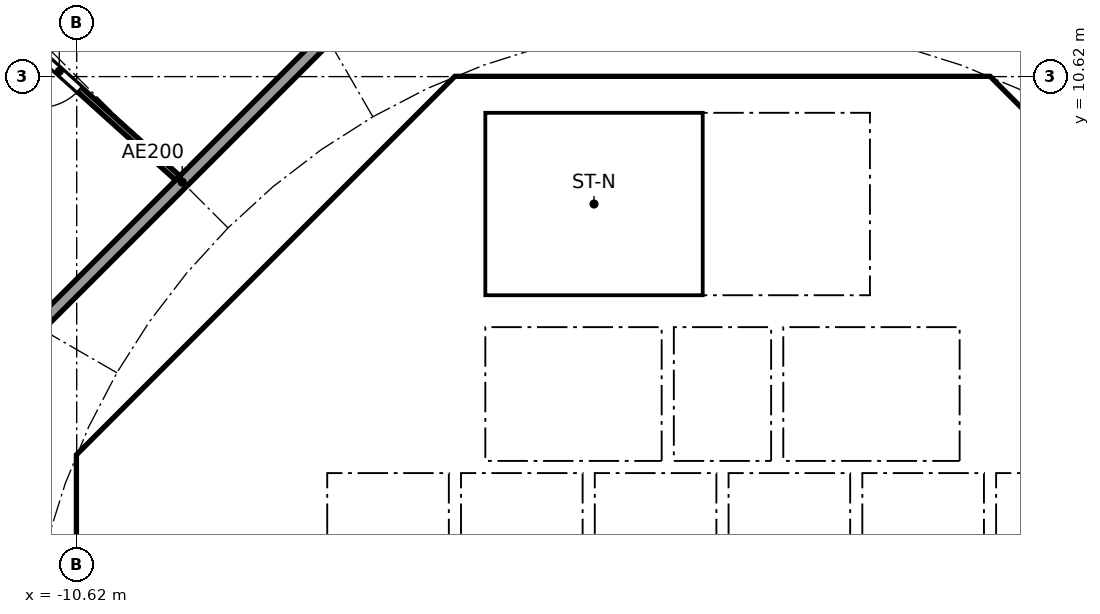
"""IFC4 building model, lengths in metres.
Left out: names, types, materials, properties, quantities, classifications, styles, units other than length and angle.
Written with IfcOpenShell. Run it as: python <this file> out.ifc"""

import sys

from ifc_helpers import new_model, si_unit, direction, frame, frame_2d, origin, place, context, subcontext, project, spatial, polyline, rectangle, outline, extrude, element, fill, save


model = new_model("IFC4")
c1 = context("Model", 3, precision=1e-05, world=origin(), true_north=direction((0.0, 1.0)))
c2 = subcontext(c1, "Body", "Model", "MODEL_VIEW")
j1 = project(units=[si_unit("LENGTHUNIT", "METRE"), si_unit("PLANEANGLEUNIT", "RADIAN")], contexts=[c1])
p1 = place(None, origin())
s1 = spatial("IfcSite", under=j1, at=p1, CompositionType="ELEMENT")
p2 = place(p1, origin())
s2 = spatial("IfcBuilding", under=s1, at=p2, CompositionType="ELEMENT")
p3 = place(p2, frame((0.0, 0.0, 73.3)))
s3 = spatial("IfcBuildingStorey", under=s2, at=p3, CompositionType="ELEMENT", Elevation=73.3)
p4 = place(p3, frame((9.988, 4.613, 0.0), z_axis=(0.0, 0.0, 1.0), x_axis=(-0.707106781187, 0.707106781187, 0.0)))
e1 = element("IfcWall", 1, at=p4, inside=s3, PredefinedType="SHEAR", context=c2, shape_type="SweptSolid", body=[
    extrude(rectangle(XDim=7.602, YDim=0.6, at=frame_2d((3.801, 0.0))), origin(), (0.0, 0.0, 1.0), 3.44),
])
p5 = place(p4, frame((3.201, 0.0, 0.0)))
e2 = element("IfcOpeningElement", 2, at=p5, cuts=e1, PredefinedType="OPENING", context=c2, shape_type="SweptSolid", body=[
    extrude(rectangle(XDim=1.2, YDim=2.1, at=frame_2d((0.6, 1.05))), frame((0.0, 0.31, 0.0), z_axis=(0.0, -1.0, 0.0), x_axis=(1.0, 0.0, 0.0)), (0.0, 0.0, 1.0), 0.62),
])
p6 = place(p3, frame((-4.613, 9.988, 0.0), z_axis=(0.0, 0.0, 1.0), x_axis=(-0.707106781187, -0.707106781187, 0.0)))
e3 = element("IfcWall", 3, at=p6, inside=s3, PredefinedType="SHEAR", context=c2, shape_type="SweptSolid", body=[
    extrude(rectangle(XDim=7.602, YDim=0.6, at=frame_2d((3.801, 0.0))), origin(), (0.0, 0.0, 1.0), 3.44),
])
p7 = place(p6, frame((0.351, 0.0, 0.0)))
e4 = element("IfcOpeningElement", 4, at=p7, cuts=e3, PredefinedType="OPENING", context=c2, shape_type="SweptSolid", body=[
    extrude(rectangle(XDim=1.1, YDim=2.1, at=frame_2d((0.55, 1.05))), frame((0.0, 0.31, 0.0), z_axis=(0.0, -1.0, 0.0), x_axis=(1.0, 0.0, 0.0)), (0.0, 0.0, 1.0), 0.62),
])
p8 = place(p3, frame((-10.325, 3.801, 0.0), z_axis=(0.0, 0.0, 1.0), x_axis=(0.0, -1.0, 0.0)))
e5 = element("IfcWall", 5, at=p8, inside=s3, PredefinedType="SHEAR", context=c2, shape_type="SweptSolid", body=[
    extrude(rectangle(XDim=7.602, YDim=0.6, at=frame_2d((3.801, 0.0))), origin(), (0.0, 0.0, 1.0), 3.44),
])
p9 = place(p8, frame((0.651, 0.0, 0.0)))
e6 = element("IfcOpeningElement", 6, at=p9, cuts=e5, PredefinedType="OPENING", context=c2, shape_type="SweptSolid", body=[
    extrude(rectangle(XDim=1.5, YDim=2.1, at=frame_2d((0.75, 1.05))), frame((0.0, 0.31, 0.0), z_axis=(0.0, -1.0, 0.0), x_axis=(1.0, 0.0, 0.0)), (0.0, 0.0, 1.0), 0.62),
])
p10 = place(p8, frame((5.451, 0.0, 0.0)))
e7 = element("IfcOpeningElement", 7, at=p10, cuts=e5, PredefinedType="OPENING", context=c2, shape_type="SweptSolid", body=[
    extrude(rectangle(XDim=1.5, YDim=2.1, at=frame_2d((0.75, 1.05))), frame((0.0, 0.31, 0.0), z_axis=(0.0, -1.0, 0.0), x_axis=(1.0, 0.0, 0.0)), (0.0, 0.0, 1.0), 0.62),
])
p11 = place(p3, frame((-6.2, 4.3, 0.0), z_axis=(0.0, 0.0, 1.0), x_axis=(0.0, 1.0, 0.0)))
e8 = element("IfcWall", 8, at=p11, inside=s3, PredefinedType="PARTITIONING", context=c2, shape_type="SweptSolid", body=[
    extrude(rectangle(XDim=3.527, YDim=0.15, at=frame_2d((1.763, 0.0))), origin(), (0.0, 0.0, 1.0), 3.44),
])
p12 = place(p11, frame((0.262, 0.0, 0.0)))
e9 = element("IfcOpeningElement", 9, at=p12, cuts=e8, PredefinedType="OPENING", context=c2, shape_type="SweptSolid", body=[
    extrude(rectangle(XDim=0.9, YDim=2.1, at=frame_2d((0.45, 1.05))), frame((0.0, 0.085, 0.0), z_axis=(0.0, -1.0, 0.0), x_axis=(1.0, 0.0, 0.0)), (0.0, 0.0, 1.0), 0.17),
])
p13 = place(p11, frame((2.138, 0.0, 0.0)))
e10 = element("IfcOpeningElement", 10, at=p13, cuts=e8, PredefinedType="OPENING", context=c2, shape_type="SweptSolid", body=[
    extrude(rectangle(XDim=0.9, YDim=2.1, at=frame_2d((0.45, 1.05))), frame((0.0, 0.085, 0.0), z_axis=(0.0, -1.0, 0.0), x_axis=(1.0, 0.0, 0.0)), (0.0, 0.0, 1.0), 0.17),
])
p14 = place(p3, frame((4.0, 4.3, 0.0), z_axis=(0.0, 0.0, 1.0), x_axis=(0.0, 1.0, 0.0)))
e11 = element("IfcWall", 11, at=p14, inside=s3, PredefinedType="SOLIDWALL", context=c2, shape_type="SweptSolid", body=[
    extrude(rectangle(XDim=2.2, YDim=0.2, at=frame_2d((1.1, 0.0))), origin(), (0.0, 0.0, 1.0), 3.44),
])
p15 = place(p14, frame((0.55, 0.0, 0.0)))
e12 = element("IfcOpeningElement", 12, at=p15, cuts=e11, PredefinedType="OPENING", context=c2, shape_type="SweptSolid", body=[
    extrude(rectangle(XDim=1.1, YDim=2.1, at=frame_2d((0.55, 1.05))), frame((0.0, 0.11, 0.0), z_axis=(0.0, -1.0, 0.0), x_axis=(1.0, 0.0, 0.0)), (0.0, 0.0, 1.0), 0.22),
])
p16 = place(p3, frame((-4.0, 4.3, 0.0), z_axis=(0.0, 0.0, 1.0), x_axis=(0.0, 1.0, 0.0)))
e13 = element("IfcWall", 13, at=p16, inside=s3, PredefinedType="SOLIDWALL", context=c2, shape_type="SweptSolid", body=[
    extrude(rectangle(XDim=2.2, YDim=0.2, at=frame_2d((1.1, 0.0))), origin(), (0.0, 0.0, 1.0), 3.44),
])
p17 = place(p16, frame((0.55, 0.0, 0.0)))
e14 = element("IfcOpeningElement", 14, at=p17, cuts=e13, PredefinedType="OPENING", context=c2, shape_type="SweptSolid", body=[
    extrude(rectangle(XDim=1.1, YDim=2.1, at=frame_2d((0.55, 1.05))), frame((0.0, 0.11, 0.0), z_axis=(0.0, -1.0, 0.0), x_axis=(1.0, 0.0, 0.0)), (0.0, 0.0, 1.0), 0.22),
])
p18 = place(p3, frame((4.0, 7.025, 0.0), z_axis=(0.0, 0.0, 1.0), x_axis=(0.0, 1.0, 0.0)))
e15 = element("IfcWall", 15, at=p18, inside=s3, PredefinedType="SOLIDWALL", context=c2, shape_type="SweptSolid", body=[
    extrude(rectangle(XDim=3.0, YDim=0.2, at=frame_2d((1.5, 0.0))), origin(), (0.0, 0.0, 1.0), 3.44),
])
p19 = place(p18, frame((0.925, 0.0, 0.0)))
e16 = element("IfcOpeningElement", 16, at=p19, cuts=e15, PredefinedType="OPENING", context=c2, shape_type="SweptSolid", body=[
    extrude(rectangle(XDim=1.1, YDim=2.1, at=frame_2d((0.55, 1.05))), frame((0.0, 0.11, 0.0), z_axis=(0.0, -1.0, 0.0), x_axis=(1.0, 0.0, 0.0)), (0.0, 0.0, 1.0), 0.22),
])
p20 = place(p3, origin())
e17 = element("IfcWall", 17, at=p20, inside=s3, PredefinedType="SHEAR", context=c2, shape_type="SweptSolid", body=[
    extrude(outline(polyline([(-10.2, 4.825), (-9.776, 4.401), (-10.025, 4.152), (-10.025, 3.801), (-10.625, 3.801), (-10.625, 4.401), (-10.2, 4.825)])), origin(), (0.0, 0.0, 1.0), 3.44),
])
p21 = place(p3, origin())
e18 = element("IfcWall", 18, at=p21, inside=s3, PredefinedType="SHEAR", context=c2, shape_type="SweptSolid", body=[
    extrude(outline(polyline([(-4.152, 10.025), (-4.401, 9.776), (-4.825, 10.2), (-4.401, 10.625), (4.401, 10.625), (4.825, 10.2), (4.401, 9.776), (4.152, 10.025), (-4.152, 10.025)])), origin(), (0.0, 0.0, 1.0), 3.44),
])
p22 = place(p3, frame((-10.025, 4.0, 0.0), z_axis=(0.0, 0.0, 1.0), x_axis=(1.0, 0.0, 0.0)))
e19 = element("IfcWall", 19, at=p22, inside=s3, PredefinedType="PARTITIONING", context=c2, shape_type="SweptSolid", body=[
    extrude(rectangle(XDim=3.325, YDim=0.2, at=frame_2d((1.662, 0.0))), origin(), (0.0, 0.0, 1.0), 3.44),
])
p23 = place(p3, frame((-8.301, 5.8, 0.0), z_axis=(0.0, 0.0, 1.0), x_axis=(1.0, 0.0, 0.0)))
e20 = element("IfcWall", 20, at=p23, inside=s3, PredefinedType="PARTITIONING", context=c2, shape_type="SweptSolid", body=[
    extrude(rectangle(XDim=2.026, YDim=0.15, at=frame_2d((1.013, 0.0))), origin(), (0.0, 0.0, 1.0), 3.44),
])
for number, where, z_axis, x_axis in (
    (21, (-0.9, 4.3, 0.0), (0.0, 0.0, 1.0), (0.0, 1.0, 0.0)),
    (22, (0.9, 4.3, 0.0), (0.0, 0.0, 1.0), (0.0, 1.0, 0.0)),
):
    element("IfcWall", number, at=place(p3, frame(where, z_axis=z_axis, x_axis=x_axis)), inside=s3, PredefinedType="SOLIDWALL", context=c2, shape_type="SweptSolid", body=[
        extrude(rectangle(XDim=2.2, YDim=0.2, at=frame_2d((1.1, 0.0))), origin(), (0.0, 0.0, 1.0), 3.44),
    ])
p24 = place(p3, origin())
e23 = element("IfcWall", 23, at=p24, inside=s3, PredefinedType="SOLIDWALL", context=c2, shape_type="SweptSolid", body=[
    extrude(outline(polyline([(-6.5, 2.1), (-6.7, 2.1), (-6.7, 4.3), (6.7, 4.3), (6.7, 2.1), (6.5, 2.1), (6.5, 4.1), (4.5, 4.1), (4.5, 2.1), (4.3, 2.1), (4.3, 4.1), (2.3, 4.1), (2.3, 2.1), (2.1, 2.1), (2.1, 4.1), (0.1, 4.1), (0.1, 2.1), (-0.1, 2.1), (-0.1, 4.1), (-2.1, 4.1), (-2.1, 2.1), (-2.3, 2.1), (-2.3, 4.1), (-4.3, 4.1), (-4.3, 2.1), (-4.5, 2.1), (-4.5, 4.1), (-6.5, 4.1), (-6.5, 2.1)])), origin(), (0.0, 0.0, 1.0), 3.44),
])
p25 = place(p3, origin())
e24 = element("IfcWall", 24, at=p25, inside=s3, PredefinedType="SOLIDWALL", context=c2, shape_type="SweptSolid", body=[
    extrude(outline(polyline([(-3.9, 7.025), (-4.1, 7.025), (-4.1, 10.025), (-3.9, 10.025), (-3.9, 7.025)])), origin(), (0.0, 0.0, 1.0), 3.44),
])
p26 = place(p3, origin())
e25 = element("IfcWall", 25, at=p26, inside=s3, PredefinedType="SOLIDWALL", context=c2, shape_type="SweptSolid", body=[
    extrude(outline(polyline([(4.1, 6.5), (-4.1, 6.5), (-4.1, 7.025), (4.1, 7.025), (4.1, 6.5)])), origin(), (0.0, 0.0, 1.0), 3.44),
])
p27 = place(p3, frame((-5.275, 12.494, 0.0), z_axis=(0.0, 0.0, 1.0), x_axis=(-0.707106781187, -0.707106781187, 0.0)))
e26 = element("IfcWall", 26, at=p27, inside=s3, PredefinedType="PARTITIONING", context=c2, shape_type="SweptSolid", body=[
    extrude(rectangle(XDim=10.209, YDim=0.2, at=frame_2d((5.104, 0.0))), origin(), (0.0, 0.0, 1.0), 3.44),
])
p28 = place(p3, frame((-8.959, 8.952, 0.0), z_axis=(0.0, 0.0, 1.0), x_axis=(-0.742679904999, 0.669646592398, 0.0)))
e27 = element("IfcWall", 27, at=p28, inside=s3, PredefinedType="PARTITIONING", context=c2, shape_type="SweptSolid", body=[
    extrude(rectangle(XDim=12.121, YDim=0.1, at=frame_2d((6.061, 0.0))), origin(), (0.0, 0.0, 1.0), 2.687),
])
p29 = place(p28, frame((2.172, 0.0, 0.0)))
e28 = element("IfcOpeningElement", 28, at=p29, cuts=e27, PredefinedType="OPENING", context=c2, shape_type="SweptSolid", body=[
    extrude(rectangle(XDim=0.9, YDim=2.1, at=frame_2d((0.45, 1.05))), frame((0.0, 0.06, 0.0), z_axis=(0.0, -1.0, 0.0), x_axis=(1.0, 0.0, 0.0)), (0.0, 0.0, 1.0), 0.12),
])
p30 = place(p28, frame((8.233, 0.0, 0.0)))
e29 = element("IfcOpeningElement", 29, at=p30, cuts=e27, PredefinedType="OPENING", context=c2, shape_type="SweptSolid", body=[
    extrude(rectangle(XDim=0.9, YDim=2.1, at=frame_2d((0.45, 1.05))), frame((0.0, 0.06, 0.0), z_axis=(0.0, -1.0, 0.0), x_axis=(1.0, 0.0, 0.0)), (0.0, 0.0, 1.0), 0.12),
])
p31 = place(p15, origin())
e30 = element("IfcDoor", 30, at=p31, inside=s3, OperationType="DOUBLE_DOOR_SLIDING", PredefinedType="DOOR", context=c2, shape_type="SweptSolid", body=[
    extrude(rectangle(XDim=1.1, YDim=2.1, at=frame_2d((0.55, 1.05))), frame((0.0, 0.025, 0.0), z_axis=(0.0, -1.0, 0.0), x_axis=(1.0, 0.0, 0.0)), (0.0, 0.0, 1.0), 0.05),
])
fill(e12, e30)
p32 = place(p17, origin())
e31 = element("IfcDoor", 31, at=p32, inside=s3, OperationType="DOUBLE_DOOR_SLIDING", PredefinedType="DOOR", context=c2, shape_type="SweptSolid", body=[
    extrude(rectangle(XDim=1.1, YDim=2.1, at=frame_2d((0.55, 1.05))), frame((0.0, 0.025, 0.0), z_axis=(0.0, -1.0, 0.0), x_axis=(1.0, 0.0, 0.0)), (0.0, 0.0, 1.0), 0.05),
])
fill(e14, e31)
p33 = place(p19, origin())
e32 = element("IfcDoor", 32, at=p33, inside=s3, OperationType="SINGLE_SWING_LEFT", PredefinedType="DOOR", context=c2, shape_type="SweptSolid", body=[
    extrude(rectangle(XDim=1.1, YDim=2.1, at=frame_2d((0.55, 1.05))), frame((0.0, 0.025, 0.0), z_axis=(0.0, -1.0, 0.0), x_axis=(1.0, 0.0, 0.0)), (0.0, 0.0, 1.0), 0.05),
])
fill(e16, e32)
p34 = place(p12, origin())
e33 = element("IfcDoor", 33, at=p34, inside=s3, OperationType="SINGLE_SWING_RIGHT", PredefinedType="DOOR", context=c2, shape_type="SweptSolid", body=[
    extrude(rectangle(XDim=0.9, YDim=2.1, at=frame_2d((0.45, 1.05))), frame((0.0, 0.025, 0.0), z_axis=(0.0, -1.0, 0.0), x_axis=(1.0, 0.0, 0.0)), (0.0, 0.0, 1.0), 0.05),
])
fill(e9, e33)
p35 = place(p13, origin())
e34 = element("IfcDoor", 34, at=p35, inside=s3, OperationType="SINGLE_SWING_RIGHT", PredefinedType="DOOR", context=c2, shape_type="SweptSolid", body=[
    extrude(rectangle(XDim=0.9, YDim=2.1, at=frame_2d((0.45, 1.05))), frame((0.0, 0.025, 0.0), z_axis=(0.0, -1.0, 0.0), x_axis=(1.0, 0.0, 0.0)), (0.0, 0.0, 1.0), 0.05),
])
fill(e10, e34)
p36 = place(p9, origin())
e35 = element("IfcDoor", 35, at=p36, inside=s3, OperationType="DOUBLE_DOOR_SINGLE_SWING", PredefinedType="DOOR", context=c2, shape_type="SweptSolid", body=[
    extrude(rectangle(XDim=1.5, YDim=2.1, at=frame_2d((0.75, 1.05))), frame((0.0, 0.025, 0.0), z_axis=(0.0, -1.0, 0.0), x_axis=(1.0, 0.0, 0.0)), (0.0, 0.0, 1.0), 0.05),
])
fill(e6, e35)
p37 = place(p7, origin())
e36 = element("IfcDoor", 36, at=p37, inside=s3, OperationType="SINGLE_SWING_LEFT", PredefinedType="DOOR", context=c2, shape_type="SweptSolid", body=[
    extrude(rectangle(XDim=1.1, YDim=2.1, at=frame_2d((0.55, 1.05))), frame((0.0, 0.025, 0.0), z_axis=(0.0, -1.0, 0.0), x_axis=(1.0, 0.0, 0.0)), (0.0, 0.0, 1.0), 0.05),
])
fill(e4, e36)
p38 = place(p29, origin())
e37 = element("IfcDoor", 37, at=p38, inside=s3, OperationType="SINGLE_SWING_RIGHT", PredefinedType="DOOR", context=c2, shape_type="SweptSolid", body=[
    extrude(rectangle(XDim=0.9, YDim=2.1, at=frame_2d((0.45, 1.05))), frame((0.0, 0.025, 0.0), z_axis=(0.0, -1.0, 0.0), x_axis=(1.0, 0.0, 0.0)), (0.0, 0.0, 1.0), 0.05),
])
fill(e28, e37)
save(model, sys.argv[1])
